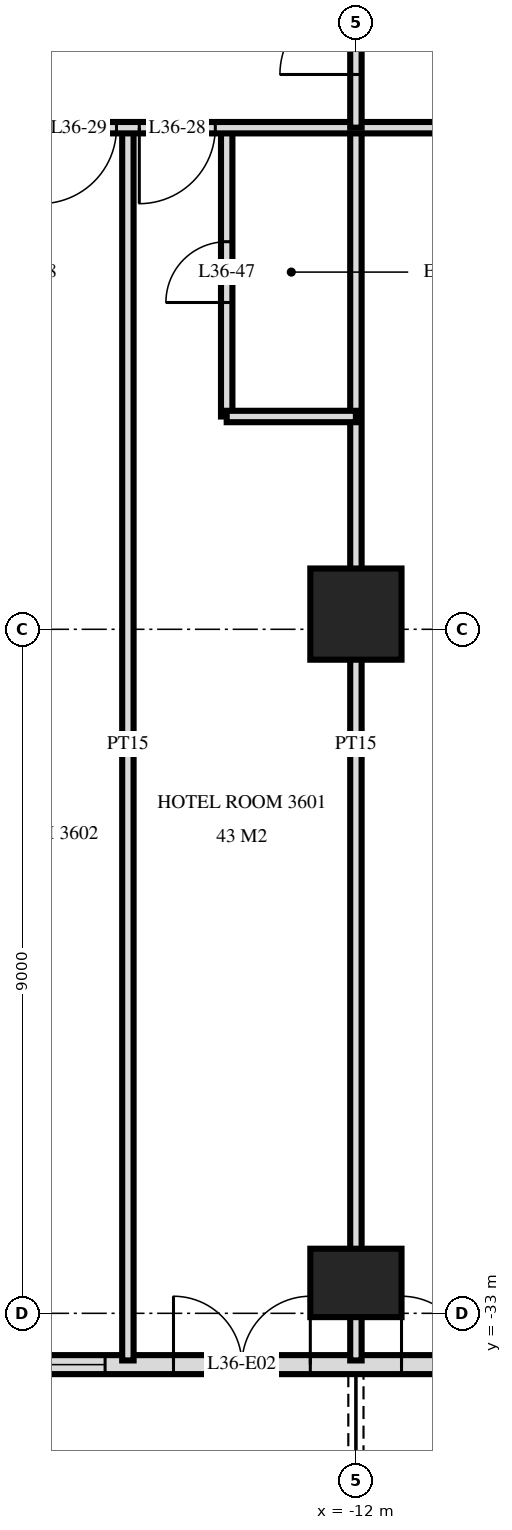
"""IFC4 building model, lengths in metres.
Left out: names, types, materials, properties, quantities, classifications, styles, units other than length and angle.
Written with IfcOpenShell. Run it as: python <this file> out.ifc"""

import sys

from ifc_helpers import new_model, si_unit, direction, frame, frame_2d, origin, origin_2d, place, context, subcontext, project, spatial, rectangle, extrude, element, fill, save


model = new_model("IFC4")
c1 = context("Model", 3, precision=1e-05, world=origin(), true_north=direction((0.0, 1.0)))
c2 = subcontext(c1, "Body", "Model", "MODEL_VIEW")
j1 = project(units=[si_unit("LENGTHUNIT", "METRE"), si_unit("PLANEANGLEUNIT", "RADIAN")], contexts=[c1])
p1 = place(None, origin())
s1 = spatial("IfcSite", under=j1, at=p1, CompositionType="ELEMENT")
p2 = place(p1, origin())
s2 = spatial("IfcBuilding", under=s1, at=p2, CompositionType="ELEMENT")
p3 = place(p2, frame((0.0, 0.0, 141.6)))
s3 = spatial("IfcBuildingStorey", under=s2, at=p3, CompositionType="ELEMENT", Elevation=141.6)
p4 = place(p3, frame((-12.0, -32.6, 0.0), z_axis=(0.0, 0.0, 1.0), x_axis=(1.0, 0.0, 0.0)))
e1 = element("IfcColumn", 1, at=p4, inside=s3, PredefinedType="COLUMN", context=c2, shape_type="SweptSolid", body=[
    extrude(rectangle(XDim=1.2, YDim=0.9, at=origin_2d()), origin(), (0.0, 0.0, 1.0), 3.6),
])
p5 = place(p3, frame((-12.0, -23.8, 0.0), z_axis=(0.0, 0.0, 1.0), x_axis=(1.0, 0.0, 0.0)))
e2 = element("IfcColumn", 2, at=p5, inside=s3, PredefinedType="COLUMN", context=c2, shape_type="SweptSolid", body=[
    extrude(rectangle(XDim=1.2, YDim=1.2, at=origin_2d()), origin(), (0.0, 0.0, 1.0), 3.6),
])
p6 = place(p3, frame((-23.675, -33.675, 0.0), z_axis=(0.0, 0.0, 1.0), x_axis=(1.0, 0.0, 0.0)))
e3 = element("IfcWall", 3, at=p6, inside=s3, PredefinedType="SOLIDWALL", context=c2, shape_type="SweptSolid", body=[
    extrude(rectangle(XDim=47.351, YDim=0.25, at=frame_2d((23.675, 0.0))), origin(), (0.0, 0.0, 1.0), 3.32),
])
p7 = place(p6, frame((0.575, 0.0, 0.0)))
e4 = element("IfcOpeningElement", 4, at=p7, cuts=e3, PredefinedType="OPENING", context=c2, shape_type="SweptSolid", body=[
    extrude(rectangle(XDim=1.8, YDim=2.4, at=frame_2d((0.9, 1.2))), frame((0.0, 0.135, 0.0), z_axis=(0.0, -1.0, 0.0), x_axis=(1.0, 0.0, 0.0)), (0.0, 0.0, 1.0), 0.27),
])
p8 = place(p6, frame((3.425, 0.0, 0.3)))
e5 = element("IfcOpeningElement", 5, at=p8, cuts=e3, PredefinedType="OPENING", context=c2, shape_type="SweptSolid", body=[
    extrude(rectangle(XDim=1.8, YDim=2.1, at=frame_2d((0.9, 1.05))), frame((0.0, 0.135, 0.0), z_axis=(0.0, -1.0, 0.0), x_axis=(1.0, 0.0, 0.0)), (0.0, 0.0, 1.0), 0.27),
])
p9 = place(p6, frame((5.975, 0.0, 0.3)))
e6 = element("IfcOpeningElement", 6, at=p9, cuts=e3, PredefinedType="OPENING", context=c2, shape_type="SweptSolid", body=[
    extrude(rectangle(XDim=2.4, YDim=2.1, at=frame_2d((1.2, 1.05))), frame((0.0, 0.135, 0.0), z_axis=(0.0, -1.0, 0.0), x_axis=(1.0, 0.0, 0.0)), (0.0, 0.0, 1.0), 0.27),
])
p10 = place(p6, frame((9.275, 0.0, 0.0)))
e7 = element("IfcOpeningElement", 7, at=p10, cuts=e3, PredefinedType="OPENING", context=c2, shape_type="SweptSolid", body=[
    extrude(rectangle(XDim=1.8, YDim=2.4, at=frame_2d((0.9, 1.2))), frame((0.0, 0.135, 0.0), z_axis=(0.0, -1.0, 0.0), x_axis=(1.0, 0.0, 0.0)), (0.0, 0.0, 1.0), 0.27),
])
p11 = place(p6, frame((12.275, 0.0, 0.0)))
e8 = element("IfcOpeningElement", 8, at=p11, cuts=e3, PredefinedType="OPENING", context=c2, shape_type="SweptSolid", body=[
    extrude(rectangle(XDim=1.8, YDim=2.4, at=frame_2d((0.9, 1.2))), frame((0.0, 0.135, 0.0), z_axis=(0.0, -1.0, 0.0), x_axis=(1.0, 0.0, 0.0)), (0.0, 0.0, 1.0), 0.27),
])
p12 = place(p6, frame((14.975, 0.0, 0.3)))
e9 = element("IfcOpeningElement", 9, at=p12, cuts=e3, PredefinedType="OPENING", context=c2, shape_type="SweptSolid", body=[
    extrude(rectangle(XDim=2.4, YDim=2.1, at=frame_2d((1.2, 1.05))), frame((0.0, 0.135, 0.0), z_axis=(0.0, -1.0, 0.0), x_axis=(1.0, 0.0, 0.0)), (0.0, 0.0, 1.0), 0.27),
])
p13 = place(p6, frame((17.975, 0.0, 0.3)))
e10 = element("IfcOpeningElement", 10, at=p13, cuts=e3, PredefinedType="OPENING", context=c2, shape_type="SweptSolid", body=[
    extrude(rectangle(XDim=2.4, YDim=2.1, at=frame_2d((1.2, 1.05))), frame((0.0, 0.135, 0.0), z_axis=(0.0, -1.0, 0.0), x_axis=(1.0, 0.0, 0.0)), (0.0, 0.0, 1.0), 0.27),
])
p14 = place(p6, frame((21.275, 0.0, 0.0)))
e11 = element("IfcOpeningElement", 11, at=p14, cuts=e3, PredefinedType="OPENING", context=c2, shape_type="SweptSolid", body=[
    extrude(rectangle(XDim=1.8, YDim=2.4, at=frame_2d((0.9, 1.2))), frame((0.0, 0.135, 0.0), z_axis=(0.0, -1.0, 0.0), x_axis=(1.0, 0.0, 0.0)), (0.0, 0.0, 1.0), 0.27),
])
p15 = place(p6, frame((24.275, 0.0, 0.0)))
e12 = element("IfcOpeningElement", 12, at=p15, cuts=e3, PredefinedType="OPENING", context=c2, shape_type="SweptSolid", body=[
    extrude(rectangle(XDim=1.8, YDim=2.4, at=frame_2d((0.9, 1.2))), frame((0.0, 0.135, 0.0), z_axis=(0.0, -1.0, 0.0), x_axis=(1.0, 0.0, 0.0)), (0.0, 0.0, 1.0), 0.27),
])
p16 = place(p6, frame((26.975, 0.0, 0.3)))
e13 = element("IfcOpeningElement", 13, at=p16, cuts=e3, PredefinedType="OPENING", context=c2, shape_type="SweptSolid", body=[
    extrude(rectangle(XDim=2.4, YDim=2.1, at=frame_2d((1.2, 1.05))), frame((0.0, 0.135, 0.0), z_axis=(0.0, -1.0, 0.0), x_axis=(1.0, 0.0, 0.0)), (0.0, 0.0, 1.0), 0.27),
])
p17 = place(p6, frame((30.275, 0.0, 0.0)))
e14 = element("IfcOpeningElement", 14, at=p17, cuts=e3, PredefinedType="OPENING", context=c2, shape_type="SweptSolid", body=[
    extrude(rectangle(XDim=1.8, YDim=2.4, at=frame_2d((0.9, 1.2))), frame((0.0, 0.135, 0.0), z_axis=(0.0, -1.0, 0.0), x_axis=(1.0, 0.0, 0.0)), (0.0, 0.0, 1.0), 0.27),
])
p18 = place(p6, frame((32.975, 0.0, 0.3)))
e15 = element("IfcOpeningElement", 15, at=p18, cuts=e3, PredefinedType="OPENING", context=c2, shape_type="SweptSolid", body=[
    extrude(rectangle(XDim=2.4, YDim=2.1, at=frame_2d((1.2, 1.05))), frame((0.0, 0.135, 0.0), z_axis=(0.0, -1.0, 0.0), x_axis=(1.0, 0.0, 0.0)), (0.0, 0.0, 1.0), 0.27),
])
p19 = place(p6, frame((36.275, 0.0, 0.0)))
e16 = element("IfcOpeningElement", 16, at=p19, cuts=e3, PredefinedType="OPENING", context=c2, shape_type="SweptSolid", body=[
    extrude(rectangle(XDim=1.8, YDim=2.4, at=frame_2d((0.9, 1.2))), frame((0.0, 0.135, 0.0), z_axis=(0.0, -1.0, 0.0), x_axis=(1.0, 0.0, 0.0)), (0.0, 0.0, 1.0), 0.27),
])
p20 = place(p6, frame((38.975, 0.0, 0.3)))
e17 = element("IfcOpeningElement", 17, at=p20, cuts=e3, PredefinedType="OPENING", context=c2, shape_type="SweptSolid", body=[
    extrude(rectangle(XDim=2.4, YDim=2.1, at=frame_2d((1.2, 1.05))), frame((0.0, 0.135, 0.0), z_axis=(0.0, -1.0, 0.0), x_axis=(1.0, 0.0, 0.0)), (0.0, 0.0, 1.0), 0.27),
])
p21 = place(p6, frame((42.275, 0.0, 0.0)))
e18 = element("IfcOpeningElement", 18, at=p21, cuts=e3, PredefinedType="OPENING", context=c2, shape_type="SweptSolid", body=[
    extrude(rectangle(XDim=1.8, YDim=2.4, at=frame_2d((0.9, 1.2))), frame((0.0, 0.135, 0.0), z_axis=(0.0, -1.0, 0.0), x_axis=(1.0, 0.0, 0.0)), (0.0, 0.0, 1.0), 0.27),
])
p22 = place(p6, frame((45.125, 0.0, 0.3)))
e19 = element("IfcOpeningElement", 19, at=p22, cuts=e3, PredefinedType="OPENING", context=c2, shape_type="SweptSolid", body=[
    extrude(rectangle(XDim=1.8, YDim=2.1, at=frame_2d((0.9, 1.05))), frame((0.0, 0.135, 0.0), z_axis=(0.0, -1.0, 0.0), x_axis=(1.0, 0.0, 0.0)), (0.0, 0.0, 1.0), 0.27),
])
p23 = place(p3, frame((-12.0, -17.4, 0.0), z_axis=(0.0, 0.0, 1.0), x_axis=(0.0, 1.0, 0.0)))
e20 = element("IfcWall", 20, at=p23, inside=s3, PredefinedType="PARTITIONING", context=c2, shape_type="SweptSolid", body=[
    extrude(rectangle(XDim=2.35, YDim=0.15, at=frame_2d((1.175, 0.0))), origin(), (0.0, 0.0, 1.0), 3.32),
])
p24 = place(p23, frame((0.7, 0.0, 0.0)))
e21 = element("IfcOpeningElement", 21, at=p24, cuts=e20, PredefinedType="OPENING", context=c2, shape_type="SweptSolid", body=[
    extrude(rectangle(XDim=1.0, YDim=2.1, at=frame_2d((0.5, 1.05))), frame((0.0, 0.085, 0.0), z_axis=(0.0, -1.0, 0.0), x_axis=(1.0, 0.0, 0.0)), (0.0, 0.0, 1.0), 0.17),
])
p25 = place(p3, frame((-12.0, -33.62, 0.0), z_axis=(0.0, 0.0, 1.0), x_axis=(0.0, 1.0, 0.0)))
e22 = element("IfcWall", 22, at=p25, inside=s3, PredefinedType="PARTITIONING", context=c2, shape_type="SweptSolid", body=[
    extrude(rectangle(XDim=16.22, YDim=0.15, at=frame_2d((8.11, 0.0))), origin(), (0.0, 0.0, 1.0), 3.32),
])
p26 = place(p3, frame((-13.7, -21.2, 0.0), z_axis=(0.0, 0.0, 1.0), x_axis=(0.0, 1.0, 0.0)))
e23 = element("IfcWall", 23, at=p26, inside=s3, PredefinedType="PARTITIONING", context=c2, shape_type="SweptSolid", body=[
    extrude(rectangle(XDim=3.8, YDim=0.15, at=frame_2d((1.9, 0.0))), origin(), (0.0, 0.0, 1.0), 3.32),
])
p27 = place(p26, frame((1.5, 0.0, 0.0)))
e24 = element("IfcOpeningElement", 24, at=p27, cuts=e23, PredefinedType="OPENING", context=c2, shape_type="SweptSolid", body=[
    extrude(rectangle(XDim=0.8, YDim=2.1, at=frame_2d((0.4, 1.05))), frame((0.0, 0.085, 0.0), z_axis=(0.0, -1.0, 0.0), x_axis=(1.0, 0.0, 0.0)), (0.0, 0.0, 1.0), 0.17),
])
p28 = place(p3, frame((-15.0, -33.62, 0.0), z_axis=(0.0, 0.0, 1.0), x_axis=(0.0, 1.0, 0.0)))
e25 = element("IfcWall", 25, at=p28, inside=s3, PredefinedType="PARTITIONING", context=c2, shape_type="SweptSolid", body=[
    extrude(rectangle(XDim=16.22, YDim=0.15, at=frame_2d((8.11, 0.0))), origin(), (0.0, 0.0, 1.0), 3.32),
])
p29 = place(p3, frame((-13.7, -21.2, 0.0), z_axis=(0.0, 0.0, 1.0), x_axis=(1.0, 0.0, 0.0)))
e26 = element("IfcWall", 26, at=p29, inside=s3, PredefinedType="PARTITIONING", context=c2, shape_type="SweptSolid", body=[
    extrude(rectangle(XDim=1.7, YDim=0.15, at=frame_2d((0.85, 0.0))), origin(), (0.0, 0.0, 1.0), 3.32),
])
p30 = place(p3, frame((-28.02, -17.4, 0.0), z_axis=(0.0, 0.0, 1.0), x_axis=(1.0, 0.0, 0.0)))
e27 = element("IfcWall", 27, at=p30, inside=s3, PredefinedType="PARTITIONING", context=c2, shape_type="SweptSolid", body=[
    extrude(rectangle(XDim=56.04, YDim=0.15, at=frame_2d((28.02, 0.0))), origin(), (0.0, 0.0, 1.0), 3.32),
])
p31 = place(p30, frame((13.17, 0.0, 0.0)))
e28 = element("IfcOpeningElement", 28, at=p31, cuts=e27, PredefinedType="OPENING", context=c2, shape_type="SweptSolid", body=[
    extrude(rectangle(XDim=1.0, YDim=2.1, at=frame_2d((0.5, 1.05))), frame((0.0, 0.085, 0.0), z_axis=(0.0, -1.0, 0.0), x_axis=(1.0, 0.0, 0.0)), (0.0, 0.0, 1.0), 0.17),
])
p32 = place(p30, frame((11.87, 0.0, 0.0)))
e29 = element("IfcOpeningElement", 29, at=p32, cuts=e27, PredefinedType="OPENING", context=c2, shape_type="SweptSolid", body=[
    extrude(rectangle(XDim=1.0, YDim=2.1, at=frame_2d((0.5, 1.05))), frame((0.0, 0.085, 0.0), z_axis=(0.0, -1.0, 0.0), x_axis=(1.0, 0.0, 0.0)), (0.0, 0.0, 1.0), 0.17),
])
p33 = place(p30, frame((2.32, 0.0, 0.0)))
e30 = element("IfcOpeningElement", 30, at=p33, cuts=e27, PredefinedType="OPENING", context=c2, shape_type="SweptSolid", body=[
    extrude(rectangle(XDim=1.0, YDim=2.1, at=frame_2d((0.5, 1.05))), frame((0.0, 0.085, 0.0), z_axis=(0.0, -1.0, 0.0), x_axis=(1.0, 0.0, 0.0)), (0.0, 0.0, 1.0), 0.17),
])
p34 = place(p30, frame((40.17, 0.0, 0.0)))
e31 = element("IfcOpeningElement", 31, at=p34, cuts=e27, PredefinedType="OPENING", context=c2, shape_type="SweptSolid", body=[
    extrude(rectangle(XDim=1.0, YDim=2.1, at=frame_2d((0.5, 1.05))), frame((0.0, 0.085, 0.0), z_axis=(0.0, -1.0, 0.0), x_axis=(1.0, 0.0, 0.0)), (0.0, 0.0, 1.0), 0.17),
])
p35 = place(p30, frame((51.22, 0.0, 0.0)))
e32 = element("IfcOpeningElement", 32, at=p35, cuts=e27, PredefinedType="OPENING", context=c2, shape_type="SweptSolid", body=[
    extrude(rectangle(XDim=1.0, YDim=2.1, at=frame_2d((0.5, 1.05))), frame((0.0, 0.085, 0.0), z_axis=(0.0, -1.0, 0.0), x_axis=(1.0, 0.0, 0.0)), (0.0, 0.0, 1.0), 0.17),
])
p36 = place(p30, frame((18.52, 0.0, 0.0)))
e33 = element("IfcOpeningElement", 33, at=p36, cuts=e27, PredefinedType="OPENING", context=c2, shape_type="SweptSolid", body=[
    extrude(rectangle(XDim=1.0, YDim=2.1, at=frame_2d((0.5, 1.05))), frame((0.0, 0.085, 0.0), z_axis=(0.0, -1.0, 0.0), x_axis=(1.0, 0.0, 0.0)), (0.0, 0.0, 1.0), 0.17),
])
p37 = place(p30, frame((26.02, 0.0, 0.0)))
e34 = element("IfcOpeningElement", 34, at=p37, cuts=e27, PredefinedType="OPENING", context=c2, shape_type="SweptSolid", body=[
    extrude(rectangle(XDim=1.0, YDim=2.1, at=frame_2d((0.5, 1.05))), frame((0.0, 0.085, 0.0), z_axis=(0.0, -1.0, 0.0), x_axis=(1.0, 0.0, 0.0)), (0.0, 0.0, 1.0), 0.17),
])
p38 = place(p30, frame((35.02, 0.0, 0.0)))
e35 = element("IfcOpeningElement", 35, at=p38, cuts=e27, PredefinedType="OPENING", context=c2, shape_type="SweptSolid", body=[
    extrude(rectangle(XDim=1.0, YDim=2.1, at=frame_2d((0.5, 1.05))), frame((0.0, 0.085, 0.0), z_axis=(0.0, -1.0, 0.0), x_axis=(1.0, 0.0, 0.0)), (0.0, 0.0, 1.0), 0.17),
])
p39 = place(p9, origin())
e36 = element("IfcWindow", 36, at=p39, inside=s3, PartitioningType="SINGLE_PANEL", PredefinedType="WINDOW", context=c2, shape_type="SweptSolid", body=[
    extrude(rectangle(XDim=2.4, YDim=2.1, at=frame_2d((1.2, 1.05))), frame((0.0, 0.03, 0.0), z_axis=(0.0, -1.0, 0.0), x_axis=(1.0, 0.0, 0.0)), (0.0, 0.0, 1.0), 0.06),
])
fill(e6, e36)
p40 = place(p10, origin())
e37 = element("IfcDoor", 37, at=p40, inside=s3, OperationType="DOUBLE_DOOR_SINGLE_SWING", PredefinedType="DOOR", context=c2, shape_type="SweptSolid", body=[
    extrude(rectangle(XDim=1.8, YDim=2.4, at=frame_2d((0.9, 1.2))), frame((0.0, 0.025, 0.0), z_axis=(0.0, -1.0, 0.0), x_axis=(1.0, 0.0, 0.0)), (0.0, 0.0, 1.0), 0.05),
])
fill(e7, e37)
p41 = place(p11, origin())
e38 = element("IfcDoor", 38, at=p41, inside=s3, OperationType="DOUBLE_DOOR_SINGLE_SWING", PredefinedType="DOOR", context=c2, shape_type="SweptSolid", body=[
    extrude(rectangle(XDim=1.8, YDim=2.4, at=frame_2d((0.9, 1.2))), frame((0.0, 0.025, 0.0), z_axis=(0.0, -1.0, 0.0), x_axis=(1.0, 0.0, 0.0)), (0.0, 0.0, 1.0), 0.05),
])
fill(e8, e38)
p42 = place(p24, origin())
e39 = element("IfcDoor", 39, at=p42, inside=s3, OperationType="SINGLE_SWING_RIGHT", PredefinedType="DOOR", context=c2, shape_type="SweptSolid", body=[
    extrude(rectangle(XDim=1.0, YDim=2.1, at=frame_2d((0.5, 1.05))), frame((0.0, 0.025, 0.0), z_axis=(0.0, -1.0, 0.0), x_axis=(1.0, 0.0, 0.0)), (0.0, 0.0, 1.0), 0.05),
])
fill(e21, e39)
p43 = place(p31, frame((0.5, 0.0, 0.0), z_axis=(0.0, 0.0, 1.0), x_axis=(-1.0, 0.0, 0.0)))
e40 = element("IfcDoor", 40, at=p43, inside=s3, OperationType="SINGLE_SWING_LEFT", PredefinedType="DOOR", context=c2, shape_type="SweptSolid", body=[
    extrude(rectangle(XDim=1.0, YDim=2.1, at=frame_2d((0.0, 1.05))), frame((0.0, -0.025, 0.0), z_axis=(0.0, 1.0, 0.0), x_axis=(-1.0, 0.0, 0.0)), (0.0, 0.0, 1.0), 0.05),
])
fill(e28, e40)
p44 = place(p32, frame((0.5, 0.0, 0.0), z_axis=(0.0, 0.0, 1.0), x_axis=(-1.0, 0.0, 0.0)))
e41 = element("IfcDoor", 41, at=p44, inside=s3, OperationType="SINGLE_SWING_LEFT", PredefinedType="DOOR", context=c2, shape_type="SweptSolid", body=[
    extrude(rectangle(XDim=1.0, YDim=2.1, at=frame_2d((0.0, 1.05))), frame((0.0, -0.025, 0.0), z_axis=(0.0, 1.0, 0.0), x_axis=(-1.0, 0.0, 0.0)), (0.0, 0.0, 1.0), 0.05),
])
fill(e29, e41)
p45 = place(p27, origin())
e42 = element("IfcDoor", 42, at=p45, inside=s3, OperationType="SINGLE_SWING_RIGHT", PredefinedType="DOOR", context=c2, shape_type="SweptSolid", body=[
    extrude(rectangle(XDim=0.8, YDim=2.1, at=frame_2d((0.4, 1.05))), frame((0.0, 0.025, 0.0), z_axis=(0.0, -1.0, 0.0), x_axis=(1.0, 0.0, 0.0)), (0.0, 0.0, 1.0), 0.05),
])
fill(e24, e42)
save(model, sys.argv[1])
